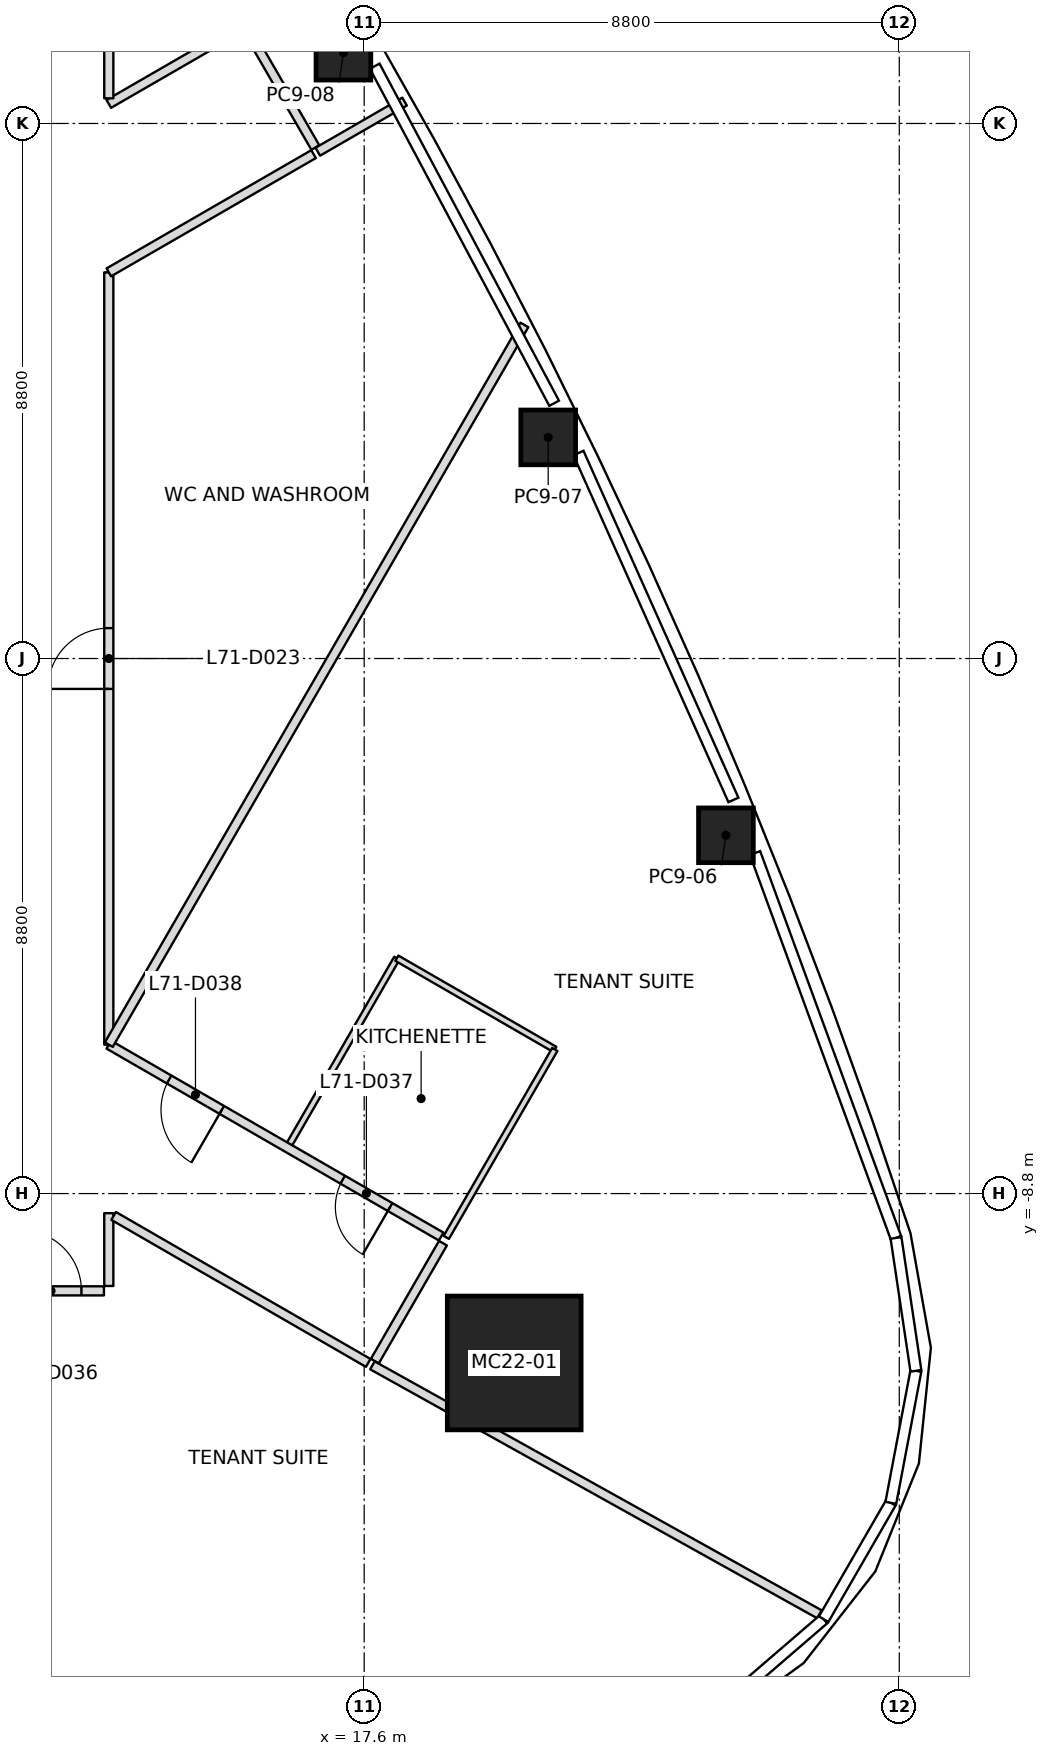
"""IFC4 building model, lengths in metres.
Left out: names, types, materials, properties, quantities, classifications, styles, units other than length and angle.
Written with IfcOpenShell. Run it as: python <this file> out.ifc"""

import sys

from ifc_helpers import new_model, si_unit, direction, frame, frame_2d, origin, origin_2d, place, context, subcontext, project, spatial, rectangle, extrude, element, fill, save


model = new_model("IFC4")
c1 = context("Model", 3, precision=1e-05, world=origin(), true_north=direction((0.0, 1.0)))
c2 = subcontext(c1, "Body", "Model", "MODEL_VIEW")
j1 = project(units=[si_unit("LENGTHUNIT", "METRE"), si_unit("PLANEANGLEUNIT", "RADIAN")], contexts=[c1])
p1 = place(None, origin())
s1 = spatial("IfcSite", under=j1, at=p1, CompositionType="ELEMENT")
p2 = place(p1, origin())
s2 = spatial("IfcBuilding", under=s1, at=p2, CompositionType="ELEMENT")
p3 = place(p2, frame((0.0, 0.0, 311.0)))
s3 = spatial("IfcBuildingStorey", under=s2, at=p3, CompositionType="ELEMENT", Elevation=311.0)
p4 = place(p3, frame((20.067, -11.586, 0.0), z_axis=(-0.027695790401, 0.015983033227, 0.999488612163), x_axis=(0.999616398022, 0.00044283261, 0.027692249912)))
e1 = element("IfcColumn", 1, at=p4, inside=s3, PredefinedType="COLUMN", context=c2, shape_type="SweptSolid", body=[
    extrude(rectangle(XDim=2.2, YDim=2.2, at=origin_2d()), origin(), (0.0, 0.0, 1.0), 4.002),
])
p5 = place(p3, frame((23.549, -2.908, 0.0), z_axis=(-0.017696558482, 0.009885663704, 0.999794531627), x_axis=(-0.375989104958, 0.926489098451, -0.015815922509)))
e2 = element("IfcColumn", 2, at=p5, inside=s3, PredefinedType="COLUMN", context=c2, shape_type="SweptSolid", body=[
    extrude(rectangle(XDim=0.9, YDim=0.9, at=origin_2d()), origin(), (0.0, 0.0, 1.0), 4.001),
])
p6 = place(p3, frame((20.626, 3.637, 0.0), z_axis=(-0.014036676147, 0.001952928855, 0.999899573853), x_axis=(-0.439027393536, 0.898438787619, -0.007917867536)))
e3 = element("IfcColumn", 3, at=p6, inside=s3, PredefinedType="COLUMN", context=c2, shape_type="SweptSolid", body=[
    extrude(rectangle(XDim=0.9, YDim=0.9, at=origin_2d()), origin(), (0.0, 0.0, 1.0), 4.0),
])
p7 = place(p3, frame((17.259, 9.964, 0.0), z_axis=(-0.009887049298, -0.00573692984, 0.999934664812), x_axis=(-0.499975560967, 0.866039512843, 2.5126546e-05)))
e4 = element("IfcColumn", 4, at=p7, inside=s3, PredefinedType="COLUMN", context=c2, shape_type="SweptSolid", body=[
    extrude(rectangle(XDim=0.9, YDim=0.9, at=origin_2d()), origin(), (0.0, 0.0, 1.0), 4.0),
])
p8 = place(p3, frame((13.4, -6.351, 0.0), z_axis=(0.0, 0.0, 1.0), x_axis=(0.500000234396, 0.866025268456, 0.0)))
e5 = element("IfcWall", 5, at=p8, inside=s3, PredefinedType="PARTITIONING", context=c2, shape_type="SweptSolid", body=[
    extrude(rectangle(XDim=13.669, YDim=0.15, at=frame_2d((6.834, 0.0))), origin(), (0.0, 0.0, 1.0), 3.234),
])
p9 = place(p3, frame((18.265, 9.159, 0.0), z_axis=(0.0, 0.0, 1.0), x_axis=(-0.866084496772, -0.499897633972, 0.0)))
e6 = element("IfcWall", 6, at=p9, inside=s3, PredefinedType="PARTITIONING", context=c2, shape_type="SweptSolid", body=[
    extrude(rectangle(XDim=1.649, YDim=0.15, at=frame_2d((0.824, 0.0))), origin(), (0.0, 0.0, 1.0), 3.234),
])
p10 = place(p3, frame((17.735, -11.625, 0.0), z_axis=(0.0, 0.0, 1.0), x_axis=(0.873657303836, -0.486541792094, 0.0)))
e7 = element("IfcWall", 7, at=p10, inside=s3, PredefinedType="PARTITIONING", context=c2, shape_type="SweptSolid", body=[
    extrude(rectangle(XDim=8.415, YDim=0.15, at=frame_2d((4.208, 0.0))), origin(), (0.0, 0.0, 1.0), 3.234),
])
p11 = place(p3, frame((1.2, -10.4, 0.0), z_axis=(0.0, 0.0, 1.0), x_axis=(1.0, 0.0, 0.0)))
e8 = element("IfcWall", 8, at=p11, inside=s3, PredefinedType="PARTITIONING", context=c2, shape_type="SweptSolid", body=[
    extrude(rectangle(XDim=12.12, YDim=0.15, at=frame_2d((6.06, 0.0))), origin(), (0.0, 0.0, 1.0), 3.393),
])
p12 = place(p11, frame((7.25, 0.0, 0.0)))
e9 = element("IfcOpeningElement", 9, at=p12, cuts=e8, PredefinedType="OPENING", context=c2, shape_type="SweptSolid", body=[
    extrude(rectangle(XDim=0.9, YDim=2.1, at=frame_2d((0.45, 1.05))), frame((0.0, 0.075, 0.0), z_axis=(0.0, -1.0, 0.0), x_axis=(1.0, 0.0, 0.0)), (0.0, 0.0, 1.0), 0.15),
])
p13 = place(p11, frame((10.75, 0.0, 0.0)))
e10 = element("IfcOpeningElement", 10, at=p13, cuts=e8, PredefinedType="OPENING", context=c2, shape_type="SweptSolid", body=[
    extrude(rectangle(XDim=1.0, YDim=2.1, at=frame_2d((0.5, 1.05))), frame((0.0, 0.075, 0.0), z_axis=(0.0, -1.0, 0.0), x_axis=(1.0, 0.0, 0.0)), (0.0, 0.0, 1.0), 0.15),
])
p14 = place(p3, frame((13.4, -10.32, 0.0), z_axis=(0.0, 0.0, 1.0), x_axis=(0.0, 1.0, 0.0)))
e11 = element("IfcWall", 11, at=p14, inside=s3, PredefinedType="PARTITIONING", context=c2, shape_type="SweptSolid", body=[
    extrude(rectangle(XDim=1.198, YDim=0.15, at=frame_2d((0.599, 0.0))), origin(), (0.0, 0.0, 1.0), 3.233),
])
p15 = place(p3, frame((13.479, -9.168, 0.0), z_axis=(0.0, 0.0, 1.0), x_axis=(0.866024961331, -0.50000076635, 0.0)))
e12 = element("IfcWall", 12, at=p15, inside=s3, PredefinedType="PARTITIONING", context=c2, shape_type="SweptSolid", body=[
    extrude(rectangle(XDim=4.834, YDim=0.15, at=frame_2d((2.417, 0.0))), origin(), (0.0, 0.0, 1.0), 3.233),
])
p16 = place(p3, frame((13.4, -6.351, 0.0), z_axis=(0.0, 0.0, 1.0), x_axis=(0.0, 1.0, 0.0)))
e13 = element("IfcWall", 13, at=p16, inside=s3, PredefinedType="PARTITIONING", context=c2, shape_type="SweptSolid", body=[
    extrude(rectangle(XDim=12.702, YDim=0.15, at=frame_2d((6.351, 0.0))), origin(), (0.0, 0.0, 1.0), 3.393),
])
p17 = place(p16, frame((5.851, 0.0, 0.0)))
e14 = element("IfcOpeningElement", 14, at=p17, cuts=e13, PredefinedType="OPENING", context=c2, shape_type="SweptSolid", body=[
    extrude(rectangle(XDim=1.0, YDim=2.1, at=frame_2d((0.5, 1.05))), frame((0.0, 0.075, 0.0), z_axis=(0.0, -1.0, 0.0), x_axis=(1.0, 0.0, 0.0)), (0.0, 0.0, 1.0), 0.15),
])
p18 = place(p3, frame((13.4, 6.351, 0.0), z_axis=(0.0, 0.0, 1.0), x_axis=(0.866024577697, 0.500001430823, 0.0)))
e15 = element("IfcWall", 15, at=p18, inside=s3, PredefinedType="PARTITIONING", context=c2, shape_type="SweptSolid", body=[
    extrude(rectangle(XDim=3.889, YDim=0.15, at=frame_2d((1.944, 0.0))), origin(), (0.0, 0.0, 1.0), 3.45),
])
p19 = place(p3, frame((18.866, -9.507, 0.0), z_axis=(0.0, 0.0, 1.0), x_axis=(-0.866040017224, 0.499974687925, 0.0)))
e16 = element("IfcWall", 16, at=p19, inside=s3, PredefinedType="PARTITIONING", context=c2, shape_type="SweptSolid", body=[
    extrude(rectangle(XDim=6.312, YDim=0.15, at=frame_2d((3.156, 0.0))), origin(), (0.0, 0.0, 1.0), 3.317),
])
p20 = place(p19, frame((0.97, 0.0, 0.0)))
e17 = element("IfcOpeningElement", 17, at=p20, cuts=e16, PredefinedType="OPENING", context=c2, shape_type="SweptSolid", body=[
    extrude(rectangle(XDim=0.9, YDim=2.1, at=frame_2d((0.45, 1.05))), frame((0.0, 0.075, 0.0), z_axis=(0.0, -1.0, 0.0), x_axis=(1.0, 0.0, 0.0)), (0.0, 0.0, 1.0), 0.15),
])
p21 = place(p19, frame((4.166, 0.0, 0.0)))
e18 = element("IfcOpeningElement", 18, at=p21, cuts=e16, PredefinedType="OPENING", context=c2, shape_type="SweptSolid", body=[
    extrude(rectangle(XDim=1.0, YDim=2.1, at=frame_2d((0.5, 1.05))), frame((0.0, 0.075, 0.0), z_axis=(0.0, -1.0, 0.0), x_axis=(1.0, 0.0, 0.0)), (0.0, 0.0, 1.0), 0.15),
])
p22 = place(p3, frame((15.567, 10.374, 0.0), z_axis=(0.0, 0.0, 1.0), x_axis=(-0.866013394656, -0.500020799843, 0.0)))
e19 = element("IfcWall", 19, at=p22, inside=s3, PredefinedType="PARTITIONING", context=c2, shape_type="SweptSolid", body=[
    extrude(rectangle(XDim=2.503, YDim=0.15, at=frame_2d((1.251, 0.0))), origin(), (0.0, 0.0, 1.0), 3.45),
])
p23 = place(p3, frame((13.4, 9.214, 0.0), z_axis=(0.0, 0.0, 1.0), x_axis=(0.0, 1.0, 0.0)))
e20 = element("IfcWall", 20, at=p23, inside=s3, PredefinedType="PARTITIONING", context=c2, shape_type="SweptSolid", body=[
    extrude(rectangle(XDim=1.106, YDim=0.15, at=frame_2d((0.553, 0.0))), origin(), (0.0, 0.0, 1.0), 3.45),
])
p24 = place(p3, frame((16.797, 8.404, 0.0), z_axis=(0.0, 0.0, 1.0), x_axis=(-0.49994888933, 0.866054910533, 0.0)))
e21 = element("IfcWall", 21, at=p24, inside=s3, PredefinedType="PARTITIONING", context=c2, shape_type="SweptSolid", body=[
    extrude(rectangle(XDim=2.24, YDim=0.15, at=frame_2d((1.12, 0.0))), origin(), (0.0, 0.0, 1.0), 3.45),
])
p25 = place(p3, frame((17.775, -11.556, 0.0), z_axis=(0.0, 0.0, 1.0), x_axis=(0.500030632641, 0.866007717299, 0.0)))
e22 = element("IfcWall", 22, at=p25, inside=s3, PredefinedType="PARTITIONING", context=c2, shape_type="SweptSolid", body=[
    extrude(rectangle(XDim=2.24, YDim=0.15, at=frame_2d((1.12, 0.0))), origin(), (0.0, 0.0, 1.0), 3.233),
])
p26 = place(p3, frame((16.352, -8.021, 0.0), z_axis=(0.0, 0.0, 1.0), x_axis=(0.499971082179, 0.866042098853, 0.0)))
e23 = element("IfcWall", 23, at=p26, inside=s3, PredefinedType="PARTITIONING", context=c2, shape_type="SweptSolid", body=[
    extrude(rectangle(XDim=3.57, YDim=0.1, at=frame_2d((1.785, 0.0))), origin(), (0.0, 0.0, 1.0), 3.45),
])
p27 = place(p3, frame((18.137, -4.929, 0.0), z_axis=(0.0, 0.0, 1.0), x_axis=(0.866031096941, -0.499990139034, 0.0)))
e24 = element("IfcWall", 24, at=p27, inside=s3, PredefinedType="PARTITIONING", context=c2, shape_type="SweptSolid", body=[
    extrude(rectangle(XDim=3.0, YDim=0.1, at=frame_2d((1.5, 0.0))), origin(), (0.0, 0.0, 1.0), 3.443),
])
p28 = place(p3, frame((20.735, -6.429, 0.0), z_axis=(0.0, 0.0, 1.0), x_axis=(-0.499971082179, -0.866042098853, 0.0)))
e25 = element("IfcWall", 25, at=p28, inside=s3, PredefinedType="PARTITIONING", context=c2, shape_type="SweptSolid", body=[
    extrude(rectangle(XDim=3.57, YDim=0.1, at=frame_2d((1.785, 0.0))), origin(), (0.0, 0.0, 1.0), 3.45),
])
p29 = place(p17, origin())
e26 = element("IfcDoor", 26, at=p29, inside=s3, OperationType="SINGLE_SWING_RIGHT", PredefinedType="DOOR", context=c2, shape_type="SweptSolid", body=[
    extrude(rectangle(XDim=1.0, YDim=2.1, at=frame_2d((0.5, 1.05))), frame((0.0, 0.025, 0.0), z_axis=(0.0, -1.0, 0.0), x_axis=(1.0, 0.0, 0.0)), (0.0, 0.0, 1.0), 0.05),
])
fill(e14, e26)
p30 = place(p13, origin())
e27 = element("IfcDoor", 27, at=p30, inside=s3, OperationType="SINGLE_SWING_RIGHT", PredefinedType="DOOR", context=c2, shape_type="SweptSolid", body=[
    extrude(rectangle(XDim=1.0, YDim=2.1, at=frame_2d((0.5, 1.05))), frame((0.0, 0.025, 0.0), z_axis=(0.0, -1.0, 0.0), x_axis=(1.0, 0.0, 0.0)), (0.0, 0.0, 1.0), 0.05),
])
fill(e10, e27)
p31 = place(p20, origin())
e28 = element("IfcDoor", 28, at=p31, inside=s3, OperationType="SINGLE_SWING_LEFT", PredefinedType="DOOR", context=c2, shape_type="SweptSolid", body=[
    extrude(rectangle(XDim=0.9, YDim=2.1, at=frame_2d((0.45, 1.05))), frame((0.0, 0.025, 0.0), z_axis=(0.0, -1.0, 0.0), x_axis=(1.0, 0.0, 0.0)), (0.0, 0.0, 1.0), 0.05),
])
fill(e17, e28)
p32 = place(p21, origin())
e29 = element("IfcDoor", 29, at=p32, inside=s3, OperationType="SINGLE_SWING_LEFT", PredefinedType="DOOR", context=c2, shape_type="SweptSolid", body=[
    extrude(rectangle(XDim=1.0, YDim=2.1, at=frame_2d((0.5, 1.05))), frame((0.0, 0.025, 0.0), z_axis=(0.0, -1.0, 0.0), x_axis=(1.0, 0.0, 0.0)), (0.0, 0.0, 1.0), 0.05),
])
fill(e18, e29)
save(model, sys.argv[1])
